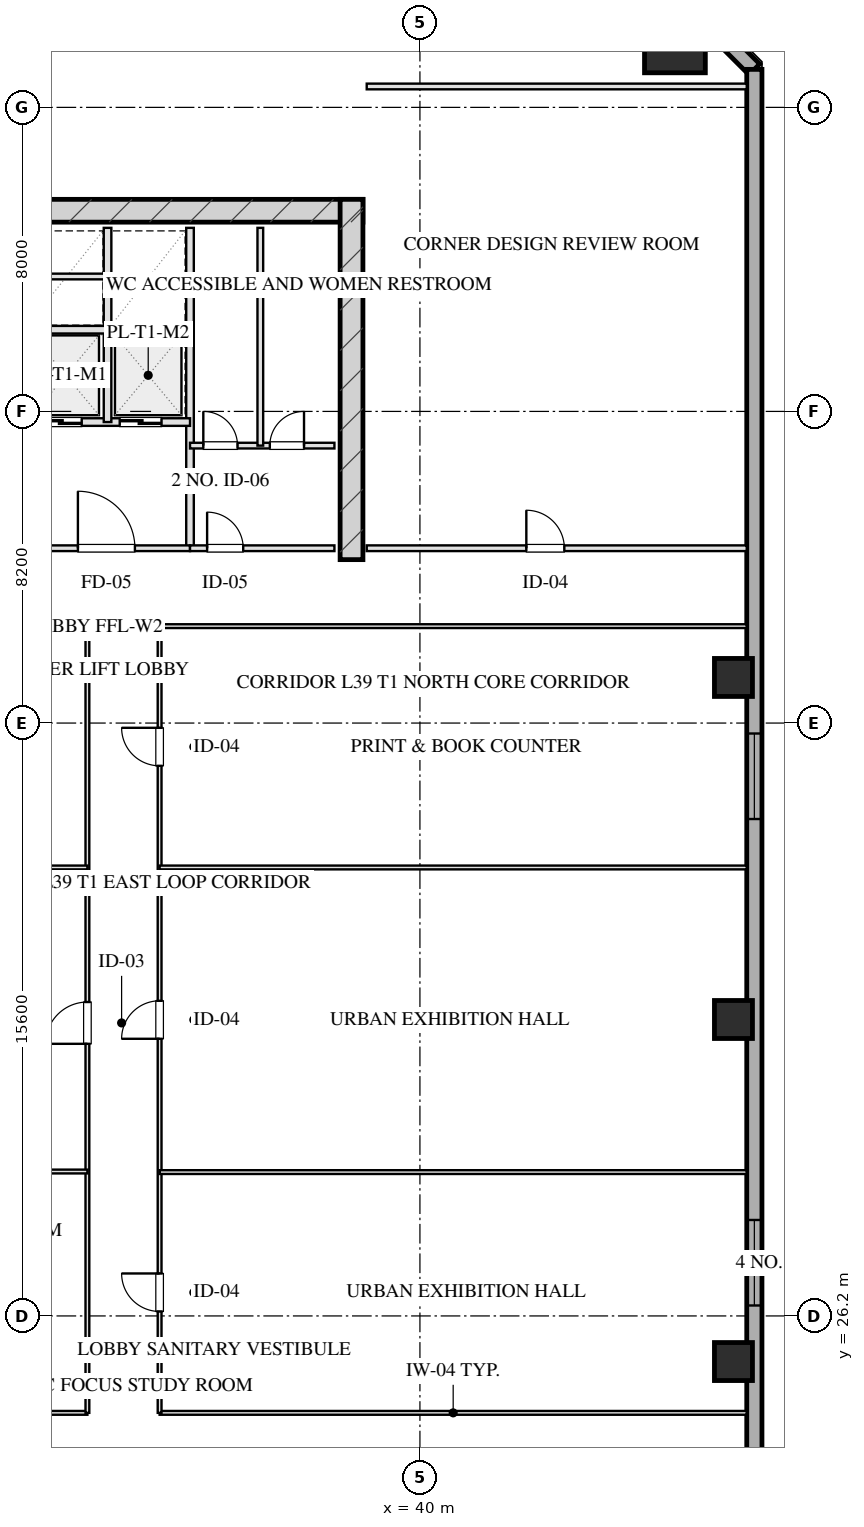
"""IFC4 building model, lengths in metres.
Left out: names, types, materials, properties, quantities, classifications, styles, units other than length and angle.
Written with IfcOpenShell. Run it as: python <this file> out.ifc"""

import sys

from ifc_helpers import new_model, si_unit, direction, frame, frame_2d, origin, origin_2d, place, context, subcontext, project, spatial, rectangle, hollow_rectangle, extrude, element, fill, save


model = new_model("IFC4")
c1 = context("Model", 3, precision=1e-05, world=origin(), true_north=direction((0.0, 1.0)))
c2 = subcontext(c1, "Body", "Model", "MODEL_VIEW")
j1 = project(units=[si_unit("LENGTHUNIT", "METRE"), si_unit("PLANEANGLEUNIT", "RADIAN")], contexts=[c1])
p1 = place(None, origin())
s1 = spatial("IfcSite", under=j1, at=p1, CompositionType="ELEMENT")
p2 = place(p1, origin())
s2 = spatial("IfcBuilding", under=s1, at=p2, CompositionType="ELEMENT")
p3 = place(p2, frame((0.0, 0.0, 149.5)))
s3 = spatial("IfcBuildingStorey", under=s2, at=p3, CompositionType="ELEMENT", Elevation=149.5)
p4 = place(p3, frame((21.5, 55.28, 0.0), z_axis=(0.0, 0.0, 1.0), x_axis=(1.0, 0.0, 0.0)))
e1 = element("IfcWall", 1, at=p4, inside=s3, PredefinedType="SHEAR", context=c2, shape_type="SweptSolid", body=[
    extrude(rectangle(XDim=17.0, YDim=0.6, at=frame_2d((8.5, 0.0))), origin(), (0.0, 0.0, 1.0), 3.45),
])
p5 = place(p3, frame((38.2, 46.1, 0.0), z_axis=(0.0, 0.0, 1.0), x_axis=(0.0, 1.0, 0.0)))
e2 = element("IfcWall", 2, at=p5, inside=s3, PredefinedType="SHEAR", context=c2, shape_type="SweptSolid", body=[
    extrude(rectangle(XDim=9.48, YDim=0.6, at=frame_2d((4.74, 0.0))), origin(), (0.0, 0.0, 1.0), 3.45),
])
p6 = place(p3, frame((46.71, 59.71, 0.0), z_axis=(0.0, 0.0, 1.0), x_axis=(1.0, 0.0, 0.0)))
e3 = element("IfcColumn", 3, at=p6, inside=s3, PredefinedType="COLUMN", context=c2, shape_type="SweptSolid", body=[
    extrude(hollow_rectangle(XDim=1.6, YDim=1.6, WallThickness=0.055, at=origin_2d()), origin(), (0.0, 0.0, 1.0), 3.451),
])
for number, where, z_axis, x_axis in (
    (4, (48.25, 25.0, 0.0), (0.0, 0.0, 1.0), (1.0, 0.0, 0.0)),
    (5, (48.25, 34.0, 0.0), (0.0, 0.0, 1.0), (1.0, 0.0, 0.0)),
    (6, (48.25, 43.0, 0.0), (0.0, 0.0, 1.0), (1.0, 0.0, 0.0)),
):
    element("IfcColumn", number, at=place(p3, frame(where, z_axis=z_axis, x_axis=x_axis)), inside=s3, PredefinedType="COLUMN", context=c2, shape_type="SweptSolid", body=[
        extrude(hollow_rectangle(XDim=1.0, YDim=1.0, WallThickness=0.036, at=origin_2d()), origin(), (0.0, 0.0, 1.0), 3.451),
    ])
p7 = place(p3, frame((46.0, 61.8, 0.0), z_axis=(0.0, 0.0, 1.0), x_axis=(0.707106781187, -0.707106781187, 0.0)))
e7 = element("IfcWall", 7, at=p7, inside=s3, PredefinedType="SOLIDWALL", context=c2, shape_type="SweptSolid", body=[
    extrude(rectangle(XDim=3.96, YDim=0.4, at=frame_2d((1.98, 0.0))), origin(), (0.0, 0.0, 1.0), 2.61),
])
p8 = place(p3, frame((48.8, 59.0, 0.0), z_axis=(0.0, 0.0, 1.0), x_axis=(0.0, -1.0, 0.0)))
e8 = element("IfcWall", 8, at=p8, inside=s3, PredefinedType="SOLIDWALL", context=c2, shape_type="SweptSolid", body=[
    extrude(rectangle(XDim=50.0, YDim=0.4, at=frame_2d((25.0, 0.0))), origin(), (0.0, 0.0, 1.0), 2.61),
])
p9 = place(p8, frame((30.275, 0.0, 0.75)))
e9 = element("IfcOpeningElement", 9, at=p9, cuts=e8, PredefinedType="OPENING", context=c2, shape_type="SweptSolid", body=[
    extrude(rectangle(XDim=2.25, YDim=1.46, at=frame_2d((1.125, 0.73))), frame((0.0, 0.21, 0.0), z_axis=(0.0, -1.0, 0.0), x_axis=(1.0, 0.0, 0.0)), (0.0, 0.0, 1.0), 0.42),
])
p10 = place(p8, frame((17.475, 0.0, 0.75)))
e10 = element("IfcOpeningElement", 10, at=p10, cuts=e8, PredefinedType="OPENING", context=c2, shape_type="SweptSolid", body=[
    extrude(rectangle(XDim=2.25, YDim=1.46, at=frame_2d((1.125, 0.73))), frame((0.0, 0.21, 0.0), z_axis=(0.0, -1.0, 0.0), x_axis=(1.0, 0.0, 0.0)), (0.0, 0.0, 1.0), 0.42),
])
p11 = place(p3, frame((33.95, 46.4, 0.0), z_axis=(0.0, 0.0, 1.0), x_axis=(0.0, 1.0, 0.0)))
e11 = element("IfcWall", 11, at=p11, inside=s3, PredefinedType="PARTITIONING", context=c2, shape_type="SweptSolid", body=[
    extrude(rectangle(XDim=8.43, YDim=0.2, at=frame_2d((4.215, 0.0))), origin(), (0.0, 0.0, 1.0), 3.175),
])
p12 = place(p3, frame((29.55, 46.4, 0.0), z_axis=(0.0, 0.0, 1.0), x_axis=(1.0, 0.0, 0.0)))
e12 = element("IfcWall", 12, at=p12, inside=s3, PredefinedType="PARTITIONING", context=c2, shape_type="SweptSolid", body=[
    extrude(rectangle(XDim=4.4, YDim=0.15, at=frame_2d((2.2, 0.0))), origin(), (0.0, 0.0, 1.0), 3.175),
])
p13 = place(p12, frame((1.45, 0.0, 0.0)))
e13 = element("IfcOpeningElement", 13, at=p13, cuts=e12, PredefinedType="OPENING", context=c2, shape_type="SweptSolid", body=[
    extrude(rectangle(XDim=1.5, YDim=2.05, at=frame_2d((0.75, 1.025))), frame((0.0, 0.085, 0.0), z_axis=(0.0, -1.0, 0.0), x_axis=(1.0, 0.0, 0.0)), (0.0, 0.0, 1.0), 0.17),
])
p14 = place(p3, frame((29.55, 49.72, 0.0), z_axis=(0.0, 0.0, 1.0), x_axis=(1.0, 0.0, 0.0)))
e14 = element("IfcWall", 14, at=p14, inside=s3, PredefinedType="PARTITIONING", context=c2, shape_type="SweptSolid", body=[
    extrude(rectangle(XDim=4.4, YDim=0.2, at=frame_2d((2.2, 0.0))), origin(), (0.0, 0.0, 1.0), 3.175),
])
p15 = place(p14, frame((0.45, 0.0, 0.0)))
e15 = element("IfcOpeningElement", 15, at=p15, cuts=e14, PredefinedType="OPENING", context=c2, shape_type="SweptSolid", body=[
    extrude(rectangle(XDim=1.1, YDim=2.05, at=frame_2d((0.55, 1.025))), frame((0.0, 0.11, 0.0), z_axis=(0.0, -1.0, 0.0), x_axis=(1.0, 0.0, 0.0)), (0.0, 0.0, 1.0), 0.22),
])
p16 = place(p14, frame((2.55, 0.0, 0.0)))
e16 = element("IfcOpeningElement", 16, at=p16, cuts=e14, PredefinedType="OPENING", context=c2, shape_type="SweptSolid", body=[
    extrude(rectangle(XDim=1.1, YDim=2.05, at=frame_2d((0.55, 1.025))), frame((0.0, 0.11, 0.0), z_axis=(0.0, -1.0, 0.0), x_axis=(1.0, 0.0, 0.0)), (0.0, 0.0, 1.0), 0.22),
])
p17 = place(p3, frame((31.78, 49.72, 0.0), z_axis=(0.0, 0.0, 1.0), x_axis=(0.0, 1.0, 0.0)))
e17 = element("IfcWall", 17, at=p17, inside=s3, PredefinedType="PARTITIONING", context=c2, shape_type="SweptSolid", body=[
    extrude(rectangle(XDim=5.11, YDim=0.2, at=frame_2d((2.555, 0.0))), origin(), (0.0, 0.0, 1.0), 3.175),
])
p18 = place(p3, frame((29.55, 52.15, 0.0), z_axis=(0.0, 0.0, 1.0), x_axis=(1.0, 0.0, 0.0)))
e18 = element("IfcWall", 18, at=p18, inside=s3, PredefinedType="PARTITIONING", context=c2, shape_type="SweptSolid", body=[
    extrude(rectangle(XDim=4.4, YDim=0.2, at=frame_2d((2.2, 0.0))), origin(), (0.0, 0.0, 1.0), 3.175),
])
p19 = place(p3, frame((29.55, 53.55, 0.0), z_axis=(0.0, 0.0, 1.0), x_axis=(1.0, 0.0, 0.0)))
e19 = element("IfcWall", 19, at=p19, inside=s3, PredefinedType="PARTITIONING", context=c2, shape_type="SweptSolid", body=[
    extrude(rectangle(XDim=2.23, YDim=0.15, at=frame_2d((1.115, 0.0))), origin(), (0.0, 0.0, 1.0), 3.175),
])
p20 = place(p3, frame((33.95, 46.4, 0.0), z_axis=(0.0, 0.0, 1.0), x_axis=(1.0, 0.0, 0.0)))
e20 = element("IfcWall", 20, at=p20, inside=s3, PredefinedType="PARTITIONING", context=c2, shape_type="SweptSolid", body=[
    extrude(rectangle(XDim=3.8, YDim=0.15, at=frame_2d((1.9, 0.0))), origin(), (0.0, 0.0, 1.0), 3.175),
])
p21 = place(p20, frame((0.45, 0.0, 0.0)))
e21 = element("IfcOpeningElement", 21, at=p21, cuts=e20, PredefinedType="OPENING", context=c2, shape_type="SweptSolid", body=[
    extrude(rectangle(XDim=0.95, YDim=2.05, at=frame_2d((0.475, 1.025))), frame((0.0, 0.085, 0.0), z_axis=(0.0, -1.0, 0.0), x_axis=(1.0, 0.0, 0.0)), (0.0, 0.0, 1.0), 0.17),
])
p22 = place(p3, frame((33.95, 49.1, 0.0), z_axis=(0.0, 0.0, 1.0), x_axis=(1.0, 0.0, 0.0)))
e22 = element("IfcWall", 22, at=p22, inside=s3, PredefinedType="PARTITIONING", context=c2, shape_type="SweptSolid", body=[
    extrude(rectangle(XDim=3.8, YDim=0.15, at=frame_2d((1.9, 0.0))), origin(), (0.0, 0.0, 1.0), 3.175),
])
p23 = place(p22, frame((0.35, 0.0, 0.0)))
e23 = element("IfcOpeningElement", 23, at=p23, cuts=e22, PredefinedType="OPENING", context=c2, shape_type="SweptSolid", body=[
    extrude(rectangle(XDim=0.9, YDim=2.05, at=frame_2d((0.45, 1.025))), frame((0.0, 0.085, 0.0), z_axis=(0.0, -1.0, 0.0), x_axis=(1.0, 0.0, 0.0)), (0.0, 0.0, 1.0), 0.17),
])
p24 = place(p22, frame((2.1, 0.0, 0.0)))
e24 = element("IfcOpeningElement", 24, at=p24, cuts=e22, PredefinedType="OPENING", context=c2, shape_type="SweptSolid", body=[
    extrude(rectangle(XDim=0.9, YDim=2.05, at=frame_2d((0.45, 1.025))), frame((0.0, 0.085, 0.0), z_axis=(0.0, -1.0, 0.0), x_axis=(1.0, 0.0, 0.0)), (0.0, 0.0, 1.0), 0.17),
])
p25 = place(p3, frame((35.8, 49.1, 0.0), z_axis=(0.0, 0.0, 1.0), x_axis=(0.0, 1.0, 0.0)))
e25 = element("IfcWall", 25, at=p25, inside=s3, PredefinedType="PARTITIONING", context=c2, shape_type="SweptSolid", body=[
    extrude(rectangle(XDim=5.73, YDim=0.15, at=frame_2d((2.865, 0.0))), origin(), (0.0, 0.0, 1.0), 3.175),
])
p26 = place(p3, frame((38.6, 58.55, 0.0), z_axis=(0.0, 0.0, 1.0), x_axis=(1.0, 0.0, 0.0)))
e26 = element("IfcWall", 26, at=p26, inside=s3, PredefinedType="PARTITIONING", context=c2, shape_type="SweptSolid", body=[
    extrude(rectangle(XDim=10.0, YDim=0.15, at=frame_2d((5.0, 0.0))), origin(), (0.0, 0.0, 1.0), 3.175),
])
p27 = place(p3, frame((38.6, 46.4, 0.0), z_axis=(0.0, 0.0, 1.0), x_axis=(1.0, 0.0, 0.0)))
e27 = element("IfcWall", 27, at=p27, inside=s3, PredefinedType="PARTITIONING", context=c2, shape_type="SweptSolid", body=[
    extrude(rectangle(XDim=10.0, YDim=0.15, at=frame_2d((5.0, 0.0))), origin(), (0.0, 0.0, 1.0), 3.175),
])
p28 = place(p27, frame((4.2, 0.0, 0.0)))
e28 = element("IfcOpeningElement", 28, at=p28, cuts=e27, PredefinedType="OPENING", context=c2, shape_type="SweptSolid", body=[
    extrude(rectangle(XDim=1.0, YDim=2.05, at=frame_2d((0.5, 1.025))), frame((0.0, 0.085, 0.0), z_axis=(0.0, -1.0, 0.0), x_axis=(1.0, 0.0, 0.0)), (0.0, 0.0, 1.0), 0.17),
])
p29 = place(p3, frame((22.3, 23.65, 0.0), z_axis=(0.0, 0.0, 1.0), x_axis=(1.0, 0.0, 0.0)))
e29 = element("IfcWall", 29, at=p29, inside=s3, PredefinedType="MOVABLE", context=c2, shape_type="SweptSolid", body=[
    extrude(rectangle(XDim=8.95, YDim=0.1, at=frame_2d((4.475, 0.0))), origin(), (0.0, 0.0, 1.0), 3.175),
])
p30 = place(p3, frame((33.15, 23.65, 0.0), z_axis=(0.0, 0.0, 1.0), x_axis=(1.0, 0.0, 0.0)))
e30 = element("IfcWall", 30, at=p30, inside=s3, PredefinedType="MOVABLE", context=c2, shape_type="SweptSolid", body=[
    extrude(rectangle(XDim=15.45, YDim=0.1, at=frame_2d((7.725, 0.0))), origin(), (0.0, 0.0, 1.0), 3.175),
])
p31 = place(p3, frame((22.3, 44.35, 0.0), z_axis=(0.0, 0.0, 1.0), x_axis=(1.0, 0.0, 0.0)))
e31 = element("IfcWall", 31, at=p31, inside=s3, PredefinedType="MOVABLE", context=c2, shape_type="SweptSolid", body=[
    extrude(rectangle(XDim=8.95, YDim=0.1, at=frame_2d((4.475, 0.0))), origin(), (0.0, 0.0, 1.0), 3.175),
])
p32 = place(p3, frame((33.15, 44.35, 0.0), z_axis=(0.0, 0.0, 1.0), x_axis=(1.0, 0.0, 0.0)))
e32 = element("IfcWall", 32, at=p32, inside=s3, PredefinedType="MOVABLE", context=c2, shape_type="SweptSolid", body=[
    extrude(rectangle(XDim=15.45, YDim=0.1, at=frame_2d((7.725, 0.0))), origin(), (0.0, 0.0, 1.0), 3.175),
])
p33 = place(p3, frame((31.25, 23.65, 0.0), z_axis=(0.0, 0.0, 1.0), x_axis=(0.0, 1.0, 0.0)))
e33 = element("IfcWall", 33, at=p33, inside=s3, PredefinedType="MOVABLE", context=c2, shape_type="SweptSolid", body=[
    extrude(rectangle(XDim=20.7, YDim=0.1, at=frame_2d((10.35, 0.0))), origin(), (0.0, 0.0, 1.0), 3.175),
])
p34 = place(p33, frame((9.71, 0.0, 0.0)))
e34 = element("IfcOpeningElement", 34, at=p34, cuts=e33, PredefinedType="OPENING", context=c2, shape_type="SweptSolid", body=[
    extrude(rectangle(XDim=1.1, YDim=2.05, at=frame_2d((0.55, 1.025))), frame((0.0, 0.06, 0.0), z_axis=(0.0, -1.0, 0.0), x_axis=(1.0, 0.0, 0.0)), (0.0, 0.0, 1.0), 0.12),
])
p35 = place(p3, frame((33.15, 23.65, 0.0), z_axis=(0.0, 0.0, 1.0), x_axis=(0.0, 1.0, 0.0)))
e35 = element("IfcWall", 35, at=p35, inside=s3, PredefinedType="MOVABLE", context=c2, shape_type="SweptSolid", body=[
    extrude(rectangle(XDim=20.7, YDim=0.1, at=frame_2d((10.35, 0.0))), origin(), (0.0, 0.0, 1.0), 3.175),
])
p36 = place(p35, frame((2.667, 0.0, 0.0)))
e36 = element("IfcOpeningElement", 36, at=p36, cuts=e35, PredefinedType="OPENING", context=c2, shape_type="SweptSolid", body=[
    extrude(rectangle(XDim=1.0, YDim=2.05, at=frame_2d((0.5, 1.025))), frame((0.0, 0.06, 0.0), z_axis=(0.0, -1.0, 0.0), x_axis=(1.0, 0.0, 0.0)), (0.0, 0.0, 1.0), 0.12),
])
p37 = place(p35, frame((9.843, 0.0, 0.0)))
e37 = element("IfcOpeningElement", 37, at=p37, cuts=e35, PredefinedType="OPENING", context=c2, shape_type="SweptSolid", body=[
    extrude(rectangle(XDim=1.0, YDim=2.05, at=frame_2d((0.5, 1.025))), frame((0.0, 0.06, 0.0), z_axis=(0.0, -1.0, 0.0), x_axis=(1.0, 0.0, 0.0)), (0.0, 0.0, 1.0), 0.12),
])
p38 = place(p35, frame((17.025, 0.0, 0.0)))
e38 = element("IfcOpeningElement", 38, at=p38, cuts=e35, PredefinedType="OPENING", context=c2, shape_type="SweptSolid", body=[
    extrude(rectangle(XDim=1.0, YDim=2.05, at=frame_2d((0.5, 1.025))), frame((0.0, 0.06, 0.0), z_axis=(0.0, -1.0, 0.0), x_axis=(1.0, 0.0, 0.0)), (0.0, 0.0, 1.0), 0.12),
])
for number, where, z_axis, x_axis in (
    (39, (22.3, 30.0, 0.0), (0.0, 0.0, 1.0), (1.0, 0.0, 0.0)),
    (40, (22.3, 38.0, 0.0), (0.0, 0.0, 1.0), (1.0, 0.0, 0.0)),
):
    element("IfcWall", number, at=place(p3, frame(where, z_axis=z_axis, x_axis=x_axis)), inside=s3, PredefinedType="MOVABLE", context=c2, shape_type="SweptSolid", body=[
        extrude(rectangle(XDim=8.95, YDim=0.1, at=frame_2d((4.475, 0.0))), origin(), (0.0, 0.0, 1.0), 3.175),
    ])
for number, where, z_axis, x_axis in (
    (41, (33.15, 29.985, 0.0), (0.0, 0.0, 1.0), (1.0, 0.0, 0.0)),
    (42, (33.15, 38.0, 0.0), (0.0, 0.0, 1.0), (1.0, 0.0, 0.0)),
):
    element("IfcWall", number, at=place(p3, frame(where, z_axis=z_axis, x_axis=x_axis)), inside=s3, PredefinedType="MOVABLE", context=c2, shape_type="SweptSolid", body=[
        extrude(rectangle(XDim=15.45, YDim=0.1, at=frame_2d((7.725, 0.0))), origin(), (0.0, 0.0, 1.0), 3.175),
    ])
p39 = place(p9, origin())
e43 = element("IfcWindow", 43, at=p39, inside=s3, PartitioningType="TRIPLE_PANEL_VERTICAL", PredefinedType="WINDOW", context=c2, shape_type="SweptSolid", body=[
    extrude(rectangle(XDim=2.25, YDim=1.46, at=frame_2d((1.125, 0.73))), frame((0.0, 0.03, 0.0), z_axis=(0.0, -1.0, 0.0), x_axis=(1.0, 0.0, 0.0)), (0.0, 0.0, 1.0), 0.06),
])
fill(e9, e43)
p40 = place(p10, origin())
e44 = element("IfcWindow", 44, at=p40, inside=s3, PartitioningType="TRIPLE_PANEL_VERTICAL", PredefinedType="WINDOW", context=c2, shape_type="SweptSolid", body=[
    extrude(rectangle(XDim=2.25, YDim=1.46, at=frame_2d((1.125, 0.73))), frame((0.0, 0.03, 0.0), z_axis=(0.0, -1.0, 0.0), x_axis=(1.0, 0.0, 0.0)), (0.0, 0.0, 1.0), 0.06),
])
fill(e10, e44)
p41 = place(p13, origin())
e45 = element("IfcDoor", 45, at=p41, inside=s3, OperationType="SINGLE_SWING_LEFT", PredefinedType="DOOR", context=c2, shape_type="SweptSolid", body=[
    extrude(rectangle(XDim=1.5, YDim=2.05, at=frame_2d((0.75, 1.025))), frame((0.0, 0.025, 0.0), z_axis=(0.0, -1.0, 0.0), x_axis=(1.0, 0.0, 0.0)), (0.0, 0.0, 1.0), 0.05),
])
fill(e13, e45)
p42 = place(p15, origin())
e46 = element("IfcDoor", 46, at=p42, inside=s3, OperationType="DOUBLE_DOOR_SLIDING", PredefinedType="DOOR", context=c2, shape_type="SweptSolid", body=[
    extrude(rectangle(XDim=1.1, YDim=2.05, at=frame_2d((0.55, 1.025))), frame((0.0, 0.025, 0.0), z_axis=(0.0, -1.0, 0.0), x_axis=(1.0, 0.0, 0.0)), (0.0, 0.0, 1.0), 0.05),
])
fill(e15, e46)
p43 = place(p16, origin())
e47 = element("IfcDoor", 47, at=p43, inside=s3, OperationType="DOUBLE_DOOR_SLIDING", PredefinedType="DOOR", context=c2, shape_type="SweptSolid", body=[
    extrude(rectangle(XDim=1.1, YDim=2.05, at=frame_2d((0.55, 1.025))), frame((0.0, 0.025, 0.0), z_axis=(0.0, -1.0, 0.0), x_axis=(1.0, 0.0, 0.0)), (0.0, 0.0, 1.0), 0.05),
])
fill(e16, e47)
p44 = place(p21, origin())
e48 = element("IfcDoor", 48, at=p44, inside=s3, OperationType="SINGLE_SWING_LEFT", PredefinedType="DOOR", context=c2, shape_type="SweptSolid", body=[
    extrude(rectangle(XDim=0.95, YDim=2.05, at=frame_2d((0.475, 1.025))), frame((0.0, 0.025, 0.0), z_axis=(0.0, -1.0, 0.0), x_axis=(1.0, 0.0, 0.0)), (0.0, 0.0, 1.0), 0.05),
])
fill(e21, e48)
p45 = place(p23, origin())
e49 = element("IfcDoor", 49, at=p45, inside=s3, OperationType="SINGLE_SWING_LEFT", PredefinedType="DOOR", context=c2, shape_type="SweptSolid", body=[
    extrude(rectangle(XDim=0.9, YDim=2.05, at=frame_2d((0.45, 1.025))), frame((0.0, 0.025, 0.0), z_axis=(0.0, -1.0, 0.0), x_axis=(1.0, 0.0, 0.0)), (0.0, 0.0, 1.0), 0.05),
])
fill(e23, e49)
p46 = place(p24, origin())
e50 = element("IfcDoor", 50, at=p46, inside=s3, OperationType="SINGLE_SWING_RIGHT", PredefinedType="DOOR", context=c2, shape_type="SweptSolid", body=[
    extrude(rectangle(XDim=0.9, YDim=2.05, at=frame_2d((0.45, 1.025))), frame((0.0, 0.025, 0.0), z_axis=(0.0, -1.0, 0.0), x_axis=(1.0, 0.0, 0.0)), (0.0, 0.0, 1.0), 0.05),
])
fill(e24, e50)
p47 = place(p28, origin())
e51 = element("IfcDoor", 51, at=p47, inside=s3, OperationType="SINGLE_SWING_LEFT", PredefinedType="DOOR", context=c2, shape_type="SweptSolid", body=[
    extrude(rectangle(XDim=1.0, YDim=2.05, at=frame_2d((0.5, 1.025))), frame((0.0, 0.025, 0.0), z_axis=(0.0, -1.0, 0.0), x_axis=(1.0, 0.0, 0.0)), (0.0, 0.0, 1.0), 0.05),
])
fill(e28, e51)
p48 = place(p34, origin())
e52 = element("IfcDoor", 52, at=p48, inside=s3, OperationType="SINGLE_SWING_LEFT", PredefinedType="DOOR", context=c2, shape_type="SweptSolid", body=[
    extrude(rectangle(XDim=1.1, YDim=2.05, at=frame_2d((0.55, 1.025))), frame((0.0, 0.025, 0.0), z_axis=(0.0, -1.0, 0.0), x_axis=(1.0, 0.0, 0.0)), (0.0, 0.0, 1.0), 0.05),
])
fill(e34, e52)
p49 = place(p36, origin())
e53 = element("IfcDoor", 53, at=p49, inside=s3, OperationType="SINGLE_SWING_RIGHT", PredefinedType="DOOR", context=c2, shape_type="SweptSolid", body=[
    extrude(rectangle(XDim=1.0, YDim=2.05, at=frame_2d((0.5, 1.025))), frame((0.0, 0.025, 0.0), z_axis=(0.0, -1.0, 0.0), x_axis=(1.0, 0.0, 0.0)), (0.0, 0.0, 1.0), 0.05),
])
fill(e36, e53)
p50 = place(p37, origin())
e54 = element("IfcDoor", 54, at=p50, inside=s3, OperationType="SINGLE_SWING_LEFT", PredefinedType="DOOR", context=c2, shape_type="SweptSolid", body=[
    extrude(rectangle(XDim=1.0, YDim=2.05, at=frame_2d((0.5, 1.025))), frame((0.0, 0.025, 0.0), z_axis=(0.0, -1.0, 0.0), x_axis=(1.0, 0.0, 0.0)), (0.0, 0.0, 1.0), 0.05),
])
fill(e37, e54)
p51 = place(p38, origin())
e55 = element("IfcDoor", 55, at=p51, inside=s3, OperationType="SINGLE_SWING_RIGHT", PredefinedType="DOOR", context=c2, shape_type="SweptSolid", body=[
    extrude(rectangle(XDim=1.0, YDim=2.05, at=frame_2d((0.5, 1.025))), frame((0.0, 0.025, 0.0), z_axis=(0.0, -1.0, 0.0), x_axis=(1.0, 0.0, 0.0)), (0.0, 0.0, 1.0), 0.05),
])
fill(e38, e55)
save(model, sys.argv[1])
